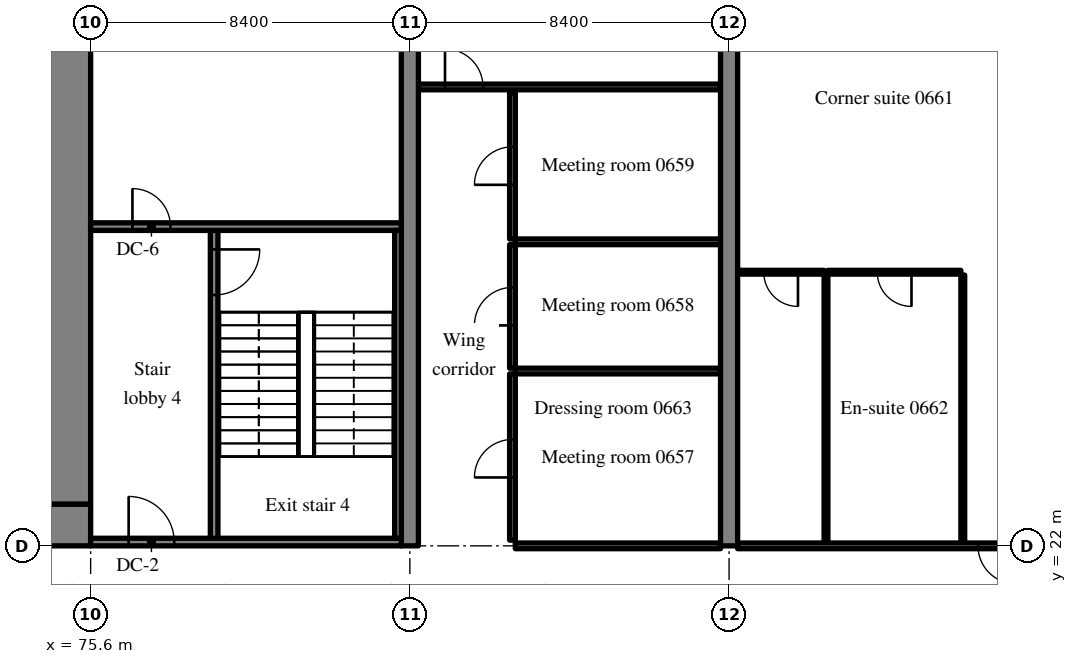
"""IFC4 building model, lengths in metres.
Left out: names, types, materials, properties, quantities, classifications, styles, units other than length and angle.
Written with IfcOpenShell. Run it as: python <this file> out.ifc"""

import sys

from ifc_helpers import new_model, si_unit, direction, frame, frame_2d, origin, place, context, subcontext, project, spatial, rectangle, extrude, source, transform, mapped, element, fill, save


model = new_model("IFC4")
c1 = context("Model", 3, precision=1e-05, world=origin(), true_north=direction((0.0, 1.0)))
c2 = subcontext(c1, "Body", "Model", "MODEL_VIEW")
j1 = project(units=[si_unit("LENGTHUNIT", "METRE"), si_unit("PLANEANGLEUNIT", "RADIAN")], contexts=[c1])
p1 = place(None, origin())
s1 = spatial("IfcSite", under=j1, at=p1, CompositionType="ELEMENT")
p2 = place(p1, origin())
s2 = spatial("IfcBuilding", under=s1, at=p2, CompositionType="ELEMENT")
p3 = place(p2, frame((0.0, 0.0, 31.6)))
s3 = spatial("IfcBuildingStorey", under=s2, at=p3, CompositionType="ELEMENT", Elevation=31.6)
m1 = source(origin(), c2, "Body", "SweptSolid", [
    extrude(rectangle(XDim=50.4, YDim=1.1, at=frame_2d((25.2, 0.0))), origin(), (0.0, 0.0, 1.0), 3.52),
])
p4 = place(p3, frame((25.2, 22.55, 0.0), z_axis=(0.0, 0.0, 1.0), x_axis=(1.0, 0.0, 0.0)))
e1 = element("IfcWall", 1, at=p4, inside=s3, PredefinedType="SHEAR", context=c2, shape_type="MappedRepresentation", body=[
    mapped(m1, transform((0.0, 0.0, 0.0), scale=1.0)),
])
m2 = source(origin(), c2, "Body", "SweptSolid", [
    extrude(rectangle(XDim=1.8, YDim=2.1, at=frame_2d((0.9, 1.05))), frame((0.0, 0.56, 0.0), z_axis=(0.0, -1.0, 0.0), x_axis=(1.0, 0.0, 0.0)), (0.0, 0.0, 1.0), 1.12),
])
p5 = place(p4, frame((15.9, 0.0, 0.0)))
e2 = element("IfcOpeningElement", 2, at=p5, cuts=e1, PredefinedType="OPENING", context=c2, shape_type="MappedRepresentation", body=[
    mapped(m2, transform((0.0, 0.0, 0.0), scale=1.0)),
])
m3 = source(origin(), c2, "Body", "SweptSolid", [
    extrude(rectangle(XDim=1.2, YDim=2.1, at=frame_2d((0.6, 1.05))), frame((0.0, 0.56, 0.0), z_axis=(0.0, -1.0, 0.0), x_axis=(1.0, 0.0, 0.0)), (0.0, 0.0, 1.0), 1.12),
])
p6 = place(p4, frame((27.0, 0.0, 0.0)))
e3 = element("IfcOpeningElement", 3, at=p6, cuts=e1, PredefinedType="OPENING", context=c2, shape_type="MappedRepresentation", body=[
    mapped(m3, transform((0.0, 0.0, 0.0), scale=1.0)),
])
m4 = source(origin(), c2, "Body", "SweptSolid", [
    extrude(rectangle(XDim=0.9, YDim=2.1, at=frame_2d((0.45, 1.05))), frame((0.0, 0.56, 0.0), z_axis=(0.0, -1.0, 0.0), x_axis=(1.0, 0.0, 0.0)), (0.0, 0.0, 1.0), 1.12),
])
p7 = place(p4, frame((32.25, 0.0, 0.0)))
e4 = element("IfcOpeningElement", 4, at=p7, cuts=e1, PredefinedType="OPENING", context=c2, shape_type="MappedRepresentation", body=[
    mapped(m4, transform((0.0, 0.0, 0.0), scale=1.0)),
])
p8 = place(p4, frame((38.25, 0.0, 0.0)))
e5 = element("IfcOpeningElement", 5, at=p8, cuts=e1, PredefinedType="OPENING", context=c2, shape_type="MappedRepresentation", body=[
    mapped(m4, transform((0.0, 0.0, 0.0), scale=1.0)),
])
p9 = place(p4, frame((6.425, 0.0, 0.0)))
e6 = element("IfcOpeningElement", 6, at=p9, cuts=e1, PredefinedType="OPENING", context=c2, shape_type="MappedRepresentation", body=[
    mapped(m3, transform((0.0, 0.0, 0.0), scale=1.0)),
])
p10 = place(p4, frame((47.675, 0.0, 0.0)))
e7 = element("IfcOpeningElement", 7, at=p10, cuts=e1, PredefinedType="OPENING", context=c2, shape_type="MappedRepresentation", body=[
    mapped(m3, transform((0.0, 0.0, 0.0), scale=1.0)),
])
m5 = source(origin(), c2, "Body", "SweptSolid", [
    extrude(rectangle(XDim=17.8, YDim=1.1, at=frame_2d((8.9, 0.0))), origin(), (0.0, 0.0, 1.0), 3.52),
])
p11 = place(p3, frame((75.05, 23.1, 0.0), z_axis=(0.0, 0.0, 1.0), x_axis=(0.0, 1.0, 0.0)))
e8 = element("IfcWall", 8, at=p11, inside=s3, PredefinedType="SHEAR", context=c2, shape_type="MappedRepresentation", body=[
    mapped(m5, transform((0.0, 0.0, 0.0), scale=1.0)),
])
p12 = place(p11, frame((12.3, 0.0, 0.0)))
e9 = element("IfcOpeningElement", 9, at=p12, cuts=e8, PredefinedType="OPENING", context=c2, shape_type="MappedRepresentation", body=[
    mapped(m3, transform((0.0, 0.0, 0.0), scale=1.0)),
])
m6 = source(origin(), c2, "Body", "SweptSolid", [
    extrude(rectangle(XDim=20.0, YDim=0.45, at=frame_2d((10.0, 0.0))), origin(), (0.0, 0.0, 1.0), 3.52),
])
for number, where, z_axis, x_axis in (
    (10, (84.0, 22.0, 0.0), (0.0, 0.0, 1.0), (0.0, 1.0, 0.0)),
    (11, (92.4, 22.0, 0.0), (0.0, 0.0, 1.0), (0.0, 1.0, 0.0)),
):
    element("IfcWall", number, at=place(p3, frame(where, z_axis=z_axis, x_axis=x_axis)), inside=s3, PredefinedType="SHEAR", context=c2, shape_type="MappedRepresentation", body=[
        mapped(m6, transform((0.0, 0.0, 0.0), scale=1.0)),
    ])
m7 = source(origin(), c2, "Body", "SweptSolid", [
    extrude(rectangle(XDim=8.3, YDim=0.2, at=frame_2d((4.15, 0.0))), origin(), (0.0, 0.0, 1.0), 3.52),
])
p13 = place(p3, frame((78.85, 22.1, 0.0), z_axis=(0.0, 0.0, 1.0), x_axis=(0.0, 1.0, 0.0)))
e12 = element("IfcWall", 12, at=p13, inside=s3, PredefinedType="SOLIDWALL", context=c2, shape_type="MappedRepresentation", body=[
    mapped(m7, transform((0.0, 0.0, 0.0), scale=1.0)),
])
m8 = source(origin(), c2, "Body", "SweptSolid", [
    extrude(rectangle(XDim=1.2, YDim=2.1, at=frame_2d((0.6, 1.05))), frame((0.0, 0.11, 0.0), z_axis=(0.0, -1.0, 0.0), x_axis=(1.0, 0.0, 0.0)), (0.0, 0.0, 1.0), 0.22),
])
p14 = place(p13, frame((6.5, 0.0, 0.0)))
e13 = element("IfcOpeningElement", 13, at=p14, cuts=e12, PredefinedType="OPENING", context=c2, shape_type="MappedRepresentation", body=[
    mapped(m8, transform((0.0, 0.0, 0.0), scale=1.0)),
])
m9 = source(origin(), c2, "Body", "SweptSolid", [
    extrude(rectangle(XDim=8.175, YDim=0.2, at=frame_2d((4.087, 0.0))), origin(), (0.0, 0.0, 1.0), 3.52),
])
p15 = place(p3, frame((83.775, 22.1, 0.0), z_axis=(0.0, 0.0, 1.0), x_axis=(-1.0, 0.0, 0.0)))
e14 = element("IfcWall", 14, at=p15, inside=s3, PredefinedType="SOLIDWALL", context=c2, shape_type="MappedRepresentation", body=[
    mapped(m9, transform((0.0, 0.0, 0.0), scale=1.0)),
])
p16 = place(p15, frame((5.975, 0.0, 0.0)))
e15 = element("IfcOpeningElement", 15, at=p16, cuts=e14, PredefinedType="OPENING", context=c2, shape_type="MappedRepresentation", body=[
    mapped(m8, transform((0.0, 0.0, 0.0), scale=1.0)),
])
p17 = place(p3, frame((83.775, 30.4, 0.0), z_axis=(0.0, 0.0, 1.0), x_axis=(-1.0, 0.0, 0.0)))
e16 = element("IfcWall", 16, at=p17, inside=s3, PredefinedType="SOLIDWALL", context=c2, shape_type="MappedRepresentation", body=[
    mapped(m9, transform((0.0, 0.0, 0.0), scale=1.0)),
])
m10 = source(origin(), c2, "Body", "SweptSolid", [
    extrude(rectangle(XDim=1.0, YDim=2.1, at=frame_2d((0.5, 1.05))), frame((0.0, 0.11, 0.0), z_axis=(0.0, -1.0, 0.0), x_axis=(1.0, 0.0, 0.0)), (0.0, 0.0, 1.0), 0.22),
])
p18 = place(p17, frame((6.075, 0.0, 0.0)))
e17 = element("IfcOpeningElement", 17, at=p18, cuts=e16, PredefinedType="OPENING", context=c2, shape_type="MappedRepresentation", body=[
    mapped(m10, transform((0.0, 0.0, 0.0), scale=1.0)),
])
m11 = source(origin(), c2, "Body", "SweptSolid", [
    extrude(rectangle(XDim=8.1, YDim=0.175, at=frame_2d((4.05, 0.0))), origin(), (0.0, 0.0, 1.0), 3.52),
])
p19 = place(p3, frame((83.688, 22.2, 0.0), z_axis=(0.0, 0.0, 1.0), x_axis=(0.0, 1.0, 0.0)))
e18 = element("IfcWall", 18, at=p19, inside=s3, PredefinedType="SOLIDWALL", context=c2, shape_type="MappedRepresentation", body=[
    mapped(m11, transform((0.0, 0.0, 0.0), scale=1.0)),
])
m12 = source(origin(), c2, "Body", "SweptSolid", [
    extrude(rectangle(XDim=5.4, YDim=0.15, at=frame_2d((2.7, 0.0))), origin(), (0.0, 0.0, 1.0), 2.82),
])
p20 = place(p3, frame((86.775, 22.0, 0.0), z_axis=(0.0, 0.0, 1.0), x_axis=(1.0, 0.0, 0.0)))
e19 = element("IfcWall", 19, at=p20, inside=s3, PredefinedType="PARTITIONING", context=c2, shape_type="MappedRepresentation", body=[
    mapped(m12, transform((0.0, 0.0, 0.0), scale=1.0)),
])
m13 = source(origin(), c2, "Body", "SweptSolid", [
    extrude(rectangle(XDim=4.375, YDim=0.15, at=frame_2d((2.188, 0.0))), origin(), (0.0, 0.0, 1.0), 3.52),
])
p21 = place(p3, frame((86.7, 22.15, 0.0), z_axis=(0.0, 0.0, 1.0), x_axis=(0.0, 1.0, 0.0)))
e20 = element("IfcWall", 20, at=p21, inside=s3, PredefinedType="PARTITIONING", context=c2, shape_type="MappedRepresentation", body=[
    mapped(m13, transform((0.0, 0.0, 0.0), scale=1.0)),
])
m14 = source(origin(), c2, "Body", "SweptSolid", [
    extrude(rectangle(XDim=1.0, YDim=2.1, at=frame_2d((0.5, 1.05))), frame((0.0, 0.085, 0.0), z_axis=(0.0, -1.0, 0.0), x_axis=(1.0, 0.0, 0.0)), (0.0, 0.0, 1.0), 0.17),
])
p22 = place(p21, frame((1.65, 0.0, 0.0)))
e21 = element("IfcOpeningElement", 21, at=p22, cuts=e20, PredefinedType="OPENING", context=c2, shape_type="MappedRepresentation", body=[
    mapped(m14, transform((0.0, 0.0, 0.0), scale=1.0)),
])
m15 = source(origin(), c2, "Body", "SweptSolid", [
    extrude(rectangle(XDim=5.4, YDim=0.15, at=frame_2d((2.7, 0.0))), origin(), (0.0, 0.0, 1.0), 3.52),
])
p23 = place(p3, frame((86.775, 26.6, 0.0), z_axis=(0.0, 0.0, 1.0), x_axis=(1.0, 0.0, 0.0)))
e22 = element("IfcWall", 22, at=p23, inside=s3, PredefinedType="PARTITIONING", context=c2, shape_type="MappedRepresentation", body=[
    mapped(m15, transform((0.0, 0.0, 0.0), scale=1.0)),
])
m16 = source(origin(), c2, "Body", "SweptSolid", [
    extrude(rectangle(XDim=3.25, YDim=0.15, at=frame_2d((1.625, 0.0))), origin(), (0.0, 0.0, 1.0), 3.52),
])
p24 = place(p3, frame((86.7, 26.675, 0.0), z_axis=(0.0, 0.0, 1.0), x_axis=(0.0, 1.0, 0.0)))
e23 = element("IfcWall", 23, at=p24, inside=s3, PredefinedType="PARTITIONING", context=c2, shape_type="MappedRepresentation", body=[
    mapped(m16, transform((0.0, 0.0, 0.0), scale=1.0)),
])
p25 = place(p24, frame((1.125, 0.0, 0.0)))
e24 = element("IfcOpeningElement", 24, at=p25, cuts=e23, PredefinedType="OPENING", context=c2, shape_type="MappedRepresentation", body=[
    mapped(m14, transform((0.0, 0.0, 0.0), scale=1.0)),
])
p26 = place(p3, frame((86.775, 30.0, 0.0), z_axis=(0.0, 0.0, 1.0), x_axis=(1.0, 0.0, 0.0)))
e25 = element("IfcWall", 25, at=p26, inside=s3, PredefinedType="PARTITIONING", context=c2, shape_type="MappedRepresentation", body=[
    mapped(m15, transform((0.0, 0.0, 0.0), scale=1.0)),
])
m17 = source(origin(), c2, "Body", "SweptSolid", [
    extrude(rectangle(XDim=3.85, YDim=0.15, at=frame_2d((1.925, 0.0))), origin(), (0.0, 0.0, 1.0), 3.52),
])
p27 = place(p3, frame((86.7, 30.075, 0.0), z_axis=(0.0, 0.0, 1.0), x_axis=(0.0, 1.0, 0.0)))
e26 = element("IfcWall", 26, at=p27, inside=s3, PredefinedType="PARTITIONING", context=c2, shape_type="MappedRepresentation", body=[
    mapped(m17, transform((0.0, 0.0, 0.0), scale=1.0)),
])
p28 = place(p27, frame((1.425, 0.0, 0.0)))
e27 = element("IfcOpeningElement", 27, at=p28, cuts=e26, PredefinedType="OPENING", context=c2, shape_type="MappedRepresentation", body=[
    mapped(m14, transform((0.0, 0.0, 0.0), scale=1.0)),
])
m18 = source(origin(), c2, "Body", "SweptSolid", [
    extrude(rectangle(XDim=7.95, YDim=0.15, at=frame_2d((3.975, 0.0))), origin(), (0.0, 0.0, 1.0), 3.52),
])
p29 = place(p3, frame((84.225, 34.075, 0.0), z_axis=(0.0, 0.0, 1.0), x_axis=(1.0, 0.0, 0.0)))
e28 = element("IfcWall", 28, at=p29, inside=s3, PredefinedType="PARTITIONING", context=c2, shape_type="MappedRepresentation", body=[
    mapped(m18, transform((0.0, 0.0, 0.0), scale=1.0)),
])
p30 = place(p29, frame((0.7, 0.0, 0.0)))
e29 = element("IfcOpeningElement", 29, at=p30, cuts=e28, PredefinedType="OPENING", context=c2, shape_type="MappedRepresentation", body=[
    mapped(m14, transform((0.0, 0.0, 0.0), scale=1.0)),
])
m19 = source(origin(), c2, "Body", "SweptSolid", [
    extrude(rectangle(XDim=7.05, YDim=0.1, at=frame_2d((3.525, 0.0))), origin(), (0.0, 0.0, 1.0), 3.52),
])
for number, where, z_axis, x_axis in (
    (30, (98.55, 22.075, 0.0), (0.0, 0.0, 1.0), (0.0, 1.0, 0.0)),
    (31, (94.95, 22.075, 0.0), (0.0, 0.0, 1.0), (0.0, 1.0, 0.0)),
):
    element("IfcWall", number, at=place(p3, frame(where, z_axis=z_axis, x_axis=x_axis)), inside=s3, PredefinedType="PARTITIONING", context=c2, shape_type="MappedRepresentation", body=[
        mapped(m19, transform((0.0, 0.0, 0.0), scale=1.0)),
    ])
m20 = source(origin(), c2, "Body", "SweptSolid", [
    extrude(rectangle(XDim=3.5, YDim=0.1, at=frame_2d((1.75, 0.0))), origin(), (0.0, 0.0, 1.0), 3.52),
])
p31 = place(p3, frame((95.0, 29.2, 0.0), z_axis=(0.0, 0.0, 1.0), x_axis=(1.0, 0.0, 0.0)))
e32 = element("IfcWall", 32, at=p31, inside=s3, PredefinedType="PARTITIONING", context=c2, shape_type="MappedRepresentation", body=[
    mapped(m20, transform((0.0, 0.0, 0.0), scale=1.0)),
])
m21 = source(origin(), c2, "Body", "SweptSolid", [
    extrude(rectangle(XDim=0.9, YDim=2.1, at=frame_2d((0.45, 1.05))), frame((0.0, 0.06, 0.0), z_axis=(0.0, -1.0, 0.0), x_axis=(1.0, 0.0, 0.0)), (0.0, 0.0, 1.0), 0.12),
])
p32 = place(p31, frame((1.3, 0.0, 0.0)))
e33 = element("IfcOpeningElement", 33, at=p32, cuts=e32, PredefinedType="OPENING", context=c2, shape_type="MappedRepresentation", body=[
    mapped(m21, transform((0.0, 0.0, 0.0), scale=1.0)),
])
m22 = source(origin(), c2, "Body", "SweptSolid", [
    extrude(rectangle(XDim=2.275, YDim=0.1, at=frame_2d((1.137, 0.0))), origin(), (0.0, 0.0, 1.0), 3.52),
])
p33 = place(p3, frame((92.625, 29.2, 0.0), z_axis=(0.0, 0.0, 1.0), x_axis=(1.0, 0.0, 0.0)))
e34 = element("IfcWall", 34, at=p33, inside=s3, PredefinedType="PARTITIONING", context=c2, shape_type="MappedRepresentation", body=[
    mapped(m22, transform((0.0, 0.0, 0.0), scale=1.0)),
])
p34 = place(p33, frame((0.688, 0.0, 0.0)))
e35 = element("IfcOpeningElement", 35, at=p34, cuts=e34, PredefinedType="OPENING", context=c2, shape_type="MappedRepresentation", body=[
    mapped(m21, transform((0.0, 0.0, 0.0), scale=1.0)),
])
m23 = source(origin(), c2, "Body", "SweptSolid", [
    extrude(rectangle(XDim=7.725, YDim=0.15, at=frame_2d((3.863, 0.0))), origin(), (0.0, 0.0, 1.0), 2.82),
])
p35 = place(p3, frame((92.625, 22.0, 0.0), z_axis=(0.0, 0.0, 1.0), x_axis=(1.0, 0.0, 0.0)))
e36 = element("IfcWall", 36, at=p35, inside=s3, PredefinedType="PARTITIONING", context=c2, shape_type="MappedRepresentation", body=[
    mapped(m23, transform((0.0, 0.0, 0.0), scale=1.0)),
])
p36 = place(p35, frame((6.325, 0.0, 0.0)))
e37 = element("IfcOpeningElement", 37, at=p36, cuts=e36, PredefinedType="OPENING", context=c2, shape_type="MappedRepresentation", body=[
    mapped(m14, transform((0.0, 0.0, 0.0), scale=1.0)),
])
m24 = source(origin(), c2, "Body", "SweptSolid", [
    extrude(rectangle(XDim=1.2, YDim=2.1, at=frame_2d((0.6, 1.05))), frame((0.0, 0.025, 0.0), z_axis=(0.0, -1.0, 0.0), x_axis=(1.0, 0.0, 0.0)), (0.0, 0.0, 1.0), 0.05),
])
p37 = place(p14, origin())
e38 = element("IfcDoor", 38, at=p37, inside=s3, OperationType="SINGLE_SWING_RIGHT", PredefinedType="DOOR", context=c2, shape_type="MappedRepresentation", body=[
    mapped(m24, transform((0.0, 0.0, 0.0), scale=1.0)),
])
fill(e13, e38)
p38 = place(p16, origin())
e39 = element("IfcDoor", 39, at=p38, inside=s3, OperationType="SINGLE_SWING_RIGHT", PredefinedType="DOOR", context=c2, shape_type="MappedRepresentation", body=[
    mapped(m24, transform((0.0, 0.0, 0.0), scale=1.0)),
])
fill(e15, e39)
m25 = source(origin(), c2, "Body", "SweptSolid", [
    extrude(rectangle(XDim=1.0, YDim=2.1, at=frame_2d((0.5, 1.05))), frame((0.0, 0.025, 0.0), z_axis=(0.0, -1.0, 0.0), x_axis=(1.0, 0.0, 0.0)), (0.0, 0.0, 1.0), 0.05),
])
p39 = place(p18, origin())
e40 = element("IfcDoor", 40, at=p39, inside=s3, OperationType="SINGLE_SWING_RIGHT", PredefinedType="DOOR", context=c2, shape_type="MappedRepresentation", body=[
    mapped(m25, transform((0.0, 0.0, 0.0), scale=1.0)),
])
fill(e17, e40)
p40 = place(p22, origin())
e41 = element("IfcDoor", 41, at=p40, inside=s3, OperationType="SINGLE_SWING_LEFT", PredefinedType="DOOR", context=c2, shape_type="MappedRepresentation", body=[
    mapped(m25, transform((0.0, 0.0, 0.0), scale=1.0)),
])
fill(e21, e41)
p41 = place(p25, origin())
e42 = element("IfcDoor", 42, at=p41, inside=s3, OperationType="SINGLE_SWING_LEFT", PredefinedType="DOOR", context=c2, shape_type="MappedRepresentation", body=[
    mapped(m25, transform((0.0, 0.0, 0.0), scale=1.0)),
])
fill(e24, e42)
p42 = place(p28, origin())
e43 = element("IfcDoor", 43, at=p42, inside=s3, OperationType="SINGLE_SWING_LEFT", PredefinedType="DOOR", context=c2, shape_type="MappedRepresentation", body=[
    mapped(m25, transform((0.0, 0.0, 0.0), scale=1.0)),
])
fill(e27, e43)
p43 = place(p30, origin())
e44 = element("IfcDoor", 44, at=p43, inside=s3, OperationType="SINGLE_SWING_LEFT", PredefinedType="DOOR", context=c2, shape_type="MappedRepresentation", body=[
    mapped(m25, transform((0.0, 0.0, 0.0), scale=1.0)),
])
fill(e29, e44)
m26 = source(origin(), c2, "Body", "SweptSolid", [
    extrude(rectangle(XDim=0.9, YDim=2.1, at=frame_2d((0.45, 1.05))), frame((0.0, 0.025, 0.0), z_axis=(0.0, -1.0, 0.0), x_axis=(1.0, 0.0, 0.0)), (0.0, 0.0, 1.0), 0.05),
])
p44 = place(p32, origin())
e45 = element("IfcDoor", 45, at=p44, inside=s3, OperationType="SINGLE_SWING_RIGHT", PredefinedType="DOOR", context=c2, shape_type="MappedRepresentation", body=[
    mapped(m26, transform((0.0, 0.0, 0.0), scale=1.0)),
])
fill(e33, e45)
p45 = place(p34, origin())
e46 = element("IfcDoor", 46, at=p45, inside=s3, OperationType="SINGLE_SWING_RIGHT", PredefinedType="DOOR", context=c2, shape_type="MappedRepresentation", body=[
    mapped(m26, transform((0.0, 0.0, 0.0), scale=1.0)),
])
fill(e35, e46)
p46 = place(p36, origin())
e47 = element("IfcDoor", 47, at=p46, inside=s3, OperationType="SINGLE_SWING_RIGHT", PredefinedType="DOOR", context=c2, shape_type="MappedRepresentation", body=[
    mapped(m25, transform((0.0, 0.0, 0.0), scale=1.0)),
])
fill(e37, e47)
save(model, sys.argv[1])
